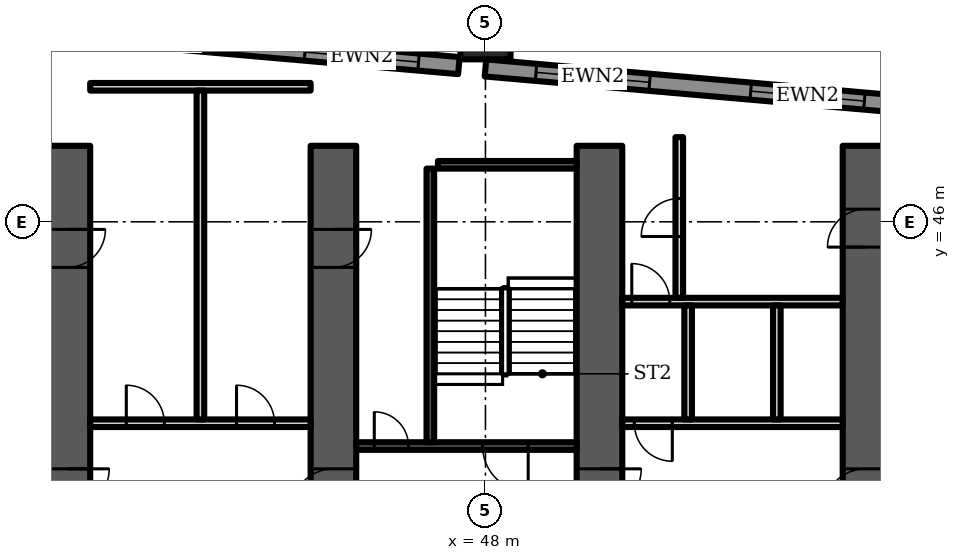
"""IFC4 building model, lengths in metres.
Left out: names, types, materials, properties, quantities, classifications, styles, units other than length and angle.
Written with IfcOpenShell. Run it as: python <this file> out.ifc"""

import sys

from ifc_helpers import new_model, si_unit, direction, frame, frame_2d, origin, origin_2d, place, context, subcontext, project, spatial, polyline, rectangle, outline, extrude, element, fill, save


model = new_model("IFC4")
c1 = context("Model", 3, precision=1e-05, world=origin(), true_north=direction((0.0, 1.0)))
c2 = subcontext(c1, "Body", "Model", "MODEL_VIEW")
j1 = project(units=[si_unit("LENGTHUNIT", "METRE"), si_unit("PLANEANGLEUNIT", "RADIAN")], contexts=[c1])
p1 = place(None, origin())
s1 = spatial("IfcSite", under=j1, at=p1, CompositionType="ELEMENT")
p2 = place(p1, origin())
s2 = spatial("IfcBuilding", under=s1, at=p2, CompositionType="ELEMENT")
p3 = place(p2, frame((0.0, 0.0, 15.0)))
s3 = spatial("IfcBuildingStorey", under=s2, at=p3, CompositionType="ELEMENT", Elevation=15.0)
p4 = place(p3, frame((48.0, 50.935, 0.0), z_axis=(0.0, 0.0, 1.0), x_axis=(1.0, 0.0, 0.0)))
e1 = element("IfcColumn", 1, at=p4, inside=s3, PredefinedType="COLUMN", context=c2, shape_type="SweptSolid", body=[
    extrude(rectangle(XDim=1.32, YDim=1.32, at=origin_2d()), origin(), (0.0, 0.0, 1.0), 6.5),
])
p5 = place(p3, frame((59.301, 49.06, 0.0), z_axis=(0.0, 0.0, 1.0), x_axis=(-0.996195, 0.087145, 0.0)))
e2 = element("IfcWall", 2, at=p5, inside=s3, PredefinedType="SOLIDWALL", context=c2, shape_type="SweptSolid", body=[
    extrude(rectangle(XDim=11.344, YDim=0.45, at=frame_2d((5.672, 0.0))), origin(), (0.0, 0.0, 1.0), 6.2),
])
p6 = place(p5, frame((1.336, 0.0, 1.0)))
e3 = element("IfcOpeningElement", 3, at=p6, cuts=e2, PredefinedType="OPENING", context=c2, shape_type="SweptSolid", body=[
    extrude(rectangle(XDim=3.0, YDim=4.2, at=frame_2d((1.5, 2.1))), frame((0.0, 0.235, 0.0), z_axis=(0.0, -1.0, 0.0), x_axis=(1.0, 0.0, 0.0)), (0.0, 0.0, 1.0), 0.47),
])
p7 = place(p5, frame((7.008, 0.0, 1.0)))
e4 = element("IfcOpeningElement", 4, at=p7, cuts=e2, PredefinedType="OPENING", context=c2, shape_type="SweptSolid", body=[
    extrude(rectangle(XDim=3.0, YDim=4.2, at=frame_2d((1.5, 2.1))), frame((0.0, 0.235, 0.0), z_axis=(0.0, -1.0, 0.0), x_axis=(1.0, 0.0, 0.0)), (0.0, 0.0, 1.0), 0.47),
])
p8 = place(p3, frame((47.301, 50.11, 0.0), z_axis=(0.0, 0.0, 1.0), x_axis=(-0.996195, 0.087143, 0.0)))
e5 = element("IfcWall", 5, at=p8, inside=s3, PredefinedType="SOLIDWALL", context=c2, shape_type="SweptSolid", body=[
    extrude(rectangle(XDim=10.26, YDim=0.45, at=frame_2d((5.13, 0.0))), origin(), (0.0, 0.0, 1.0), 6.2),
])
p9 = place(p8, frame((1.065, 0.0, 1.0)))
e6 = element("IfcOpeningElement", 6, at=p9, cuts=e5, PredefinedType="OPENING", context=c2, shape_type="SweptSolid", body=[
    extrude(rectangle(XDim=3.0, YDim=4.2, at=frame_2d((1.5, 2.1))), frame((0.0, 0.235, 0.0), z_axis=(0.0, -1.0, 0.0), x_axis=(1.0, 0.0, 0.0)), (0.0, 0.0, 1.0), 0.47),
])
p10 = place(p8, frame((6.195, 0.0, 1.0)))
e7 = element("IfcOpeningElement", 7, at=p10, cuts=e5, PredefinedType="OPENING", context=c2, shape_type="SweptSolid", body=[
    extrude(rectangle(XDim=3.0, YDim=4.2, at=frame_2d((1.5, 2.1))), frame((0.0, 0.235, 0.0), z_axis=(0.0, -1.0, 0.0), x_axis=(1.0, 0.0, 0.0)), (0.0, 0.0, 1.0), 0.47),
])
p11 = place(p3, frame((37.0, 35.2, 0.0), z_axis=(0.0, 0.0, 1.0), x_axis=(0.0, 1.0, 0.0)))
e8 = element("IfcWall", 8, at=p11, inside=s3, PredefinedType="SHEAR", context=c2, shape_type="SweptSolid", body=[
    extrude(rectangle(XDim=12.8, YDim=1.2, at=frame_2d((6.4, 0.0))), origin(), (0.0, 0.0, 1.0), 6.2),
])
p12 = place(p11, frame((3.2, 0.0, 0.0)))
e9 = element("IfcOpeningElement", 9, at=p12, cuts=e8, PredefinedType="OPENING", context=c2, shape_type="SweptSolid", body=[
    extrude(rectangle(XDim=1.1, YDim=2.1, at=frame_2d((0.55, 1.05))), frame((0.0, 0.61, 0.0), z_axis=(0.0, -1.0, 0.0), x_axis=(1.0, 0.0, 0.0)), (0.0, 0.0, 1.0), 1.22),
])
p13 = place(p11, frame((9.6, 0.0, 0.0)))
e10 = element("IfcOpeningElement", 10, at=p13, cuts=e8, PredefinedType="OPENING", context=c2, shape_type="SweptSolid", body=[
    extrude(rectangle(XDim=1.0, YDim=2.1, at=frame_2d((0.5, 1.05))), frame((0.0, 0.61, 0.0), z_axis=(0.0, -1.0, 0.0), x_axis=(1.0, 0.0, 0.0)), (0.0, 0.0, 1.0), 1.22),
])
p14 = place(p3, frame((44.0, 35.2, 0.0), z_axis=(0.0, 0.0, 1.0), x_axis=(0.0, 1.0, 0.0)))
e11 = element("IfcWall", 11, at=p14, inside=s3, PredefinedType="SHEAR", context=c2, shape_type="SweptSolid", body=[
    extrude(rectangle(XDim=12.8, YDim=1.2, at=frame_2d((6.4, 0.0))), origin(), (0.0, 0.0, 1.0), 6.2),
])
p15 = place(p14, frame((3.2, 0.0, 0.0)))
e12 = element("IfcOpeningElement", 12, at=p15, cuts=e11, PredefinedType="OPENING", context=c2, shape_type="SweptSolid", body=[
    extrude(rectangle(XDim=1.1, YDim=2.1, at=frame_2d((0.55, 1.05))), frame((0.0, 0.61, 0.0), z_axis=(0.0, -1.0, 0.0), x_axis=(1.0, 0.0, 0.0)), (0.0, 0.0, 1.0), 1.22),
])
p16 = place(p14, frame((9.6, 0.0, 0.0)))
e13 = element("IfcOpeningElement", 13, at=p16, cuts=e11, PredefinedType="OPENING", context=c2, shape_type="SweptSolid", body=[
    extrude(rectangle(XDim=1.0, YDim=2.1, at=frame_2d((0.5, 1.05))), frame((0.0, 0.61, 0.0), z_axis=(0.0, -1.0, 0.0), x_axis=(1.0, 0.0, 0.0)), (0.0, 0.0, 1.0), 1.22),
])
p17 = place(p3, frame((51.0, 35.2, 0.0), z_axis=(0.0, 0.0, 1.0), x_axis=(0.0, 1.0, 0.0)))
e14 = element("IfcWall", 14, at=p17, inside=s3, PredefinedType="SHEAR", context=c2, shape_type="SweptSolid", body=[
    extrude(rectangle(XDim=12.8, YDim=1.2, at=frame_2d((6.4, 0.0))), origin(), (0.0, 0.0, 1.0), 6.2),
])
p18 = place(p17, frame((3.2, 0.0, 0.0)))
e15 = element("IfcOpeningElement", 15, at=p18, cuts=e14, PredefinedType="OPENING", context=c2, shape_type="SweptSolid", body=[
    extrude(rectangle(XDim=1.1, YDim=2.1, at=frame_2d((0.55, 1.05))), frame((0.0, 0.61, 0.0), z_axis=(0.0, -1.0, 0.0), x_axis=(1.0, 0.0, 0.0)), (0.0, 0.0, 1.0), 1.22),
])
p19 = place(p3, frame((58.0, 35.2, 0.0), z_axis=(0.0, 0.0, 1.0), x_axis=(0.0, 1.0, 0.0)))
e16 = element("IfcWall", 16, at=p19, inside=s3, PredefinedType="SHEAR", context=c2, shape_type="SweptSolid", body=[
    extrude(rectangle(XDim=12.8, YDim=1.2, at=frame_2d((6.4, 0.0))), origin(), (0.0, 0.0, 1.0), 6.2),
])
p20 = place(p19, frame((10.134, 0.0, 0.0)))
e17 = element("IfcOpeningElement", 17, at=p20, cuts=e16, PredefinedType="OPENING", context=c2, shape_type="SweptSolid", body=[
    extrude(rectangle(XDim=1.0, YDim=2.1, at=frame_2d((0.5, 1.05))), frame((0.0, 0.61, 0.0), z_axis=(0.0, -1.0, 0.0), x_axis=(1.0, 0.0, 0.0)), (0.0, 0.0, 1.0), 1.22),
])
p21 = place(p19, frame((3.2, 0.0, 0.0)))
e18 = element("IfcOpeningElement", 18, at=p21, cuts=e16, PredefinedType="OPENING", context=c2, shape_type="SweptSolid", body=[
    extrude(rectangle(XDim=1.1, YDim=2.1, at=frame_2d((0.55, 1.05))), frame((0.0, 0.61, 0.0), z_axis=(0.0, -1.0, 0.0), x_axis=(1.0, 0.0, 0.0)), (0.0, 0.0, 1.0), 1.22),
])
p22 = place(p3, frame((37.6, 40.7, 0.0), z_axis=(0.0, 0.0, 1.0), x_axis=(1.0, 0.0, 0.0)))
e19 = element("IfcWall", 19, at=p22, inside=s3, PredefinedType="PARTITIONING", context=c2, shape_type="SweptSolid", body=[
    extrude(rectangle(XDim=5.8, YDim=0.2, at=frame_2d((2.9, 0.0))), origin(), (0.0, 0.0, 1.0), 6.2),
])
p23 = place(p22, frame((0.95, 0.0, 0.0)))
e20 = element("IfcOpeningElement", 20, at=p23, cuts=e19, PredefinedType="OPENING", context=c2, shape_type="SweptSolid", body=[
    extrude(rectangle(XDim=1.0, YDim=2.1, at=frame_2d((0.5, 1.05))), frame((0.0, 0.11, 0.0), z_axis=(0.0, -1.0, 0.0), x_axis=(1.0, 0.0, 0.0)), (0.0, 0.0, 1.0), 0.22),
])
p24 = place(p22, frame((3.85, 0.0, 0.0)))
e21 = element("IfcOpeningElement", 21, at=p24, cuts=e19, PredefinedType="OPENING", context=c2, shape_type="SweptSolid", body=[
    extrude(rectangle(XDim=1.0, YDim=2.1, at=frame_2d((0.5, 1.05))), frame((0.0, 0.11, 0.0), z_axis=(0.0, -1.0, 0.0), x_axis=(1.0, 0.0, 0.0)), (0.0, 0.0, 1.0), 0.22),
])
p25 = place(p3, frame((37.6, 49.552, 0.0), z_axis=(0.0, 0.0, 1.0), x_axis=(1.0, 0.0, 0.0)))
e22 = element("IfcWall", 22, at=p25, inside=s3, PredefinedType="PARTITIONING", context=c2, shape_type="SweptSolid", body=[
    extrude(rectangle(XDim=5.8, YDim=0.2, at=frame_2d((2.9, 0.0))), origin(), (0.0, 0.0, 1.0), 6.2),
])
p26 = place(p3, frame((40.5, 40.8, 0.0), z_axis=(0.0, 0.0, 1.0), x_axis=(0.0, 1.0, 0.0)))
e23 = element("IfcWall", 23, at=p26, inside=s3, PredefinedType="PARTITIONING", context=c2, shape_type="SweptSolid", body=[
    extrude(rectangle(XDim=8.653, YDim=0.2, at=frame_2d((4.326, 0.0))), origin(), (0.0, 0.0, 1.0), 6.2),
])
p27 = place(p3, frame((44.6, 40.1, 0.0), z_axis=(0.0, 0.0, 1.0), x_axis=(1.0, 0.0, 0.0)))
e24 = element("IfcWall", 24, at=p27, inside=s3, PredefinedType="SHEAR", context=c2, shape_type="SweptSolid", body=[
    extrude(rectangle(XDim=5.8, YDim=0.2, at=frame_2d((2.9, 0.0))), origin(), (0.0, 0.0, 1.0), 6.2),
])
p28 = place(p27, frame((3.325, 0.0, 0.0)))
e25 = element("IfcOpeningElement", 25, at=p28, cuts=e24, PredefinedType="OPENING", context=c2, shape_type="SweptSolid", body=[
    extrude(rectangle(XDim=1.2, YDim=2.1, at=frame_2d((0.6, 1.05))), frame((0.0, 0.11, 0.0), z_axis=(0.0, -1.0, 0.0), x_axis=(1.0, 0.0, 0.0)), (0.0, 0.0, 1.0), 0.22),
])
p29 = place(p27, frame((0.475, 0.0, 0.0)))
e26 = element("IfcOpeningElement", 26, at=p29, cuts=e24, PredefinedType="OPENING", context=c2, shape_type="SweptSolid", body=[
    extrude(rectangle(XDim=0.9, YDim=2.1, at=frame_2d((0.45, 1.05))), frame((0.0, 0.11, 0.0), z_axis=(0.0, -1.0, 0.0), x_axis=(1.0, 0.0, 0.0)), (0.0, 0.0, 1.0), 0.22),
])
p30 = place(p3, frame((46.55, 40.2, 0.0), z_axis=(0.0, 0.0, 1.0), x_axis=(0.0, 1.0, 0.0)))
e27 = element("IfcWall", 27, at=p30, inside=s3, PredefinedType="SHEAR", context=c2, shape_type="SweptSolid", body=[
    extrude(rectangle(XDim=7.2, YDim=0.2, at=frame_2d((3.6, 0.0))), origin(), (0.0, 0.0, 1.0), 6.2),
])
p31 = place(p3, frame((46.75, 47.5, 0.0), z_axis=(0.0, 0.0, 1.0), x_axis=(1.0, 0.0, 0.0)))
e28 = element("IfcWall", 28, at=p31, inside=s3, PredefinedType="SHEAR", context=c2, shape_type="SweptSolid", body=[
    extrude(rectangle(XDim=3.65, YDim=0.2, at=frame_2d((1.825, 0.0))), origin(), (0.0, 0.0, 1.0), 6.2),
])
p32 = place(p3, frame((51.6, 40.7, 0.0), z_axis=(0.0, 0.0, 1.0), x_axis=(1.0, 0.0, 0.0)))
e29 = element("IfcWall", 29, at=p32, inside=s3, PredefinedType="PARTITIONING", context=c2, shape_type="SweptSolid", body=[
    extrude(rectangle(XDim=5.8, YDim=0.2, at=frame_2d((2.9, 0.0))), origin(), (0.0, 0.0, 1.0), 6.2),
])
p33 = place(p32, frame((0.317, 0.0, 0.0)))
e30 = element("IfcOpeningElement", 30, at=p33, cuts=e29, PredefinedType="OPENING", context=c2, shape_type="SweptSolid", body=[
    extrude(rectangle(XDim=1.0, YDim=2.1, at=frame_2d((0.5, 1.05))), frame((0.0, 0.11, 0.0), z_axis=(0.0, -1.0, 0.0), x_axis=(1.0, 0.0, 0.0)), (0.0, 0.0, 1.0), 0.22),
])
p34 = place(p3, frame((51.6, 43.9, 0.0), z_axis=(0.0, 0.0, 1.0), x_axis=(1.0, 0.0, 0.0)))
e31 = element("IfcWall", 31, at=p34, inside=s3, PredefinedType="PARTITIONING", context=c2, shape_type="SweptSolid", body=[
    extrude(rectangle(XDim=5.8, YDim=0.2, at=frame_2d((2.9, 0.0))), origin(), (0.0, 0.0, 1.0), 6.2),
])
p35 = place(p34, frame((0.25, 0.0, 0.0)))
e32 = element("IfcOpeningElement", 32, at=p35, cuts=e31, PredefinedType="OPENING", context=c2, shape_type="SweptSolid", body=[
    extrude(rectangle(XDim=1.0, YDim=2.1, at=frame_2d((0.5, 1.05))), frame((0.0, 0.11, 0.0), z_axis=(0.0, -1.0, 0.0), x_axis=(1.0, 0.0, 0.0)), (0.0, 0.0, 1.0), 0.22),
])
p36 = place(p3, frame((0.0, 0.0, -0.0)))
e33 = element("IfcWall", 33, at=p36, inside=s3, PredefinedType="PARTITIONING", context=c2, shape_type="SweptSolid", body=[
    extrude(outline(polyline([(53.233, 40.8), (53.233, 43.8), (53.433, 43.8), (53.433, 40.8), (53.233, 40.8)])), origin(), (0.0, 0.0, 1.0), 6.2),
])
p37 = place(p3, frame((0.0, 0.0, -0.0)))
e34 = element("IfcWall", 34, at=p37, inside=s3, PredefinedType="PARTITIONING", context=c2, shape_type="SweptSolid", body=[
    extrude(outline(polyline([(55.567, 40.8), (55.567, 43.8), (55.767, 43.8), (55.767, 40.8), (55.567, 40.8)])), origin(), (0.0, 0.0, 1.0), 6.2),
])
p38 = place(p3, frame((53.1, 44.0, 0.0), z_axis=(0.0, 0.0, 1.0), x_axis=(0.0, 1.0, 0.0)))
e35 = element("IfcWall", 35, at=p38, inside=s3, PredefinedType="PARTITIONING", context=c2, shape_type="SweptSolid", body=[
    extrude(rectangle(XDim=4.228, YDim=0.2, at=frame_2d((2.114, 0.0))), origin(), (0.0, 0.0, 1.0), 6.2),
])
p39 = place(p38, frame((1.614, 0.0, 0.0)))
e36 = element("IfcOpeningElement", 36, at=p39, cuts=e35, PredefinedType="OPENING", context=c2, shape_type="SweptSolid", body=[
    extrude(rectangle(XDim=1.0, YDim=2.1, at=frame_2d((0.5, 1.05))), frame((0.0, 0.11, 0.0), z_axis=(0.0, -1.0, 0.0), x_axis=(1.0, 0.0, 0.0)), (0.0, 0.0, 1.0), 0.22),
])
p40 = place(p6, origin())
e37 = element("IfcWindow", 37, at=p40, inside=s3, PartitioningType="SINGLE_PANEL", PredefinedType="WINDOW", context=c2, shape_type="SweptSolid", body=[
    extrude(rectangle(XDim=3.0, YDim=4.2, at=frame_2d((1.5, 2.1))), frame((0.0, 0.105, 0.0), z_axis=(0.0, -1.0, 0.0), x_axis=(1.0, 0.0, 0.0)), (0.0, 0.0, 1.0), 0.06),
])
fill(e3, e37)
p41 = place(p7, origin())
e38 = element("IfcWindow", 38, at=p41, inside=s3, PartitioningType="SINGLE_PANEL", PredefinedType="WINDOW", context=c2, shape_type="SweptSolid", body=[
    extrude(rectangle(XDim=3.0, YDim=4.2, at=frame_2d((1.5, 2.1))), frame((0.0, 0.105, 0.0), z_axis=(0.0, -1.0, 0.0), x_axis=(1.0, 0.0, 0.0)), (0.0, 0.0, 1.0), 0.06),
])
fill(e4, e38)
p42 = place(p9, origin())
e39 = element("IfcWindow", 39, at=p42, inside=s3, PartitioningType="SINGLE_PANEL", PredefinedType="WINDOW", context=c2, shape_type="SweptSolid", body=[
    extrude(rectangle(XDim=3.0, YDim=4.2, at=frame_2d((1.5, 2.1))), frame((0.0, 0.105, 0.0), z_axis=(0.0, -1.0, 0.0), x_axis=(1.0, 0.0, 0.0)), (0.0, 0.0, 1.0), 0.06),
])
fill(e6, e39)
p43 = place(p23, origin())
e40 = element("IfcDoor", 40, at=p43, inside=s3, OperationType="SINGLE_SWING_LEFT", PredefinedType="DOOR", context=c2, shape_type="SweptSolid", body=[
    extrude(rectangle(XDim=1.0, YDim=2.1, at=frame_2d((0.5, 1.05))), frame((0.0, 0.025, 0.0), z_axis=(0.0, -1.0, 0.0), x_axis=(1.0, 0.0, 0.0)), (0.0, 0.0, 1.0), 0.05),
])
fill(e20, e40)
p44 = place(p24, origin())
e41 = element("IfcDoor", 41, at=p44, inside=s3, OperationType="SINGLE_SWING_LEFT", PredefinedType="DOOR", context=c2, shape_type="SweptSolid", body=[
    extrude(rectangle(XDim=1.0, YDim=2.1, at=frame_2d((0.5, 1.05))), frame((0.0, 0.025, 0.0), z_axis=(0.0, -1.0, 0.0), x_axis=(1.0, 0.0, 0.0)), (0.0, 0.0, 1.0), 0.05),
])
fill(e21, e41)
p45 = place(p28, origin())
e42 = element("IfcDoor", 42, at=p45, inside=s3, OperationType="SINGLE_SWING_RIGHT", PredefinedType="DOOR", context=c2, shape_type="SweptSolid", body=[
    extrude(rectangle(XDim=1.2, YDim=2.1, at=frame_2d((0.6, 1.05))), frame((0.0, 0.025, 0.0), z_axis=(0.0, -1.0, 0.0), x_axis=(1.0, 0.0, 0.0)), (0.0, 0.0, 1.0), 0.05),
])
fill(e25, e42)
p46 = place(p29, origin())
e43 = element("IfcDoor", 43, at=p46, inside=s3, OperationType="SINGLE_SWING_LEFT", PredefinedType="DOOR", context=c2, shape_type="SweptSolid", body=[
    extrude(rectangle(XDim=0.9, YDim=2.1, at=frame_2d((0.45, 1.05))), frame((0.0, 0.025, 0.0), z_axis=(0.0, -1.0, 0.0), x_axis=(1.0, 0.0, 0.0)), (0.0, 0.0, 1.0), 0.05),
])
fill(e26, e43)
p47 = place(p33, origin())
e44 = element("IfcDoor", 44, at=p47, inside=s3, OperationType="SINGLE_SWING_RIGHT", PredefinedType="DOOR", context=c2, shape_type="SweptSolid", body=[
    extrude(rectangle(XDim=1.0, YDim=2.1, at=frame_2d((0.5, 1.05))), frame((0.0, 0.025, 0.0), z_axis=(0.0, -1.0, 0.0), x_axis=(1.0, 0.0, 0.0)), (0.0, 0.0, 1.0), 0.05),
])
fill(e30, e44)
p48 = place(p35, origin())
e45 = element("IfcDoor", 45, at=p48, inside=s3, OperationType="SINGLE_SWING_LEFT", PredefinedType="DOOR", context=c2, shape_type="SweptSolid", body=[
    extrude(rectangle(XDim=1.0, YDim=2.1, at=frame_2d((0.5, 1.05))), frame((0.0, 0.025, 0.0), z_axis=(0.0, -1.0, 0.0), x_axis=(1.0, 0.0, 0.0)), (0.0, 0.0, 1.0), 0.05),
])
fill(e32, e45)
p49 = place(p39, origin())
e46 = element("IfcDoor", 46, at=p49, inside=s3, OperationType="SINGLE_SWING_LEFT", PredefinedType="DOOR", context=c2, shape_type="SweptSolid", body=[
    extrude(rectangle(XDim=1.0, YDim=2.1, at=frame_2d((0.5, 1.05))), frame((0.0, 0.025, 0.0), z_axis=(0.0, -1.0, 0.0), x_axis=(1.0, 0.0, 0.0)), (0.0, 0.0, 1.0), 0.05),
])
fill(e36, e46)
p50 = place(p20, origin())
e47 = element("IfcDoor", 47, at=p50, inside=s3, OperationType="SINGLE_SWING_LEFT", PredefinedType="DOOR", context=c2, shape_type="SweptSolid", body=[
    extrude(rectangle(XDim=1.0, YDim=2.1, at=frame_2d((0.5, 1.05))), frame((0.0, 0.6, 0.0), z_axis=(0.0, -1.0, 0.0), x_axis=(1.0, 0.0, 0.0)), (0.0, 0.0, 1.0), 1.199),
])
fill(e17, e47)
p51 = place(p12, origin())
e48 = element("IfcDoor", 48, at=p51, inside=s3, OperationType="SINGLE_SWING_RIGHT", PredefinedType="DOOR", context=c2, shape_type="SweptSolid", body=[
    extrude(rectangle(XDim=1.1, YDim=2.1, at=frame_2d((0.55, 1.05))), frame((0.0, 0.025, 0.0), z_axis=(0.0, -1.0, 0.0), x_axis=(1.0, 0.0, 0.0)), (0.0, 0.0, 1.0), 0.05),
])
fill(e9, e48)
p52 = place(p13, origin())
e49 = element("IfcDoor", 49, at=p52, inside=s3, OperationType="SINGLE_SWING_RIGHT", PredefinedType="DOOR", context=c2, shape_type="SweptSolid", body=[
    extrude(rectangle(XDim=1.0, YDim=2.1, at=frame_2d((0.5, 1.05))), frame((0.0, 0.6, 0.0), z_axis=(0.0, -1.0, 0.0), x_axis=(1.0, 0.0, 0.0)), (0.0, 0.0, 1.0), 1.199),
])
fill(e10, e49)
p53 = place(p15, origin())
e50 = element("IfcDoor", 50, at=p53, inside=s3, OperationType="SINGLE_SWING_LEFT", PredefinedType="DOOR", context=c2, shape_type="SweptSolid", body=[
    extrude(rectangle(XDim=1.1, YDim=2.1, at=frame_2d((0.55, 1.05))), frame((0.0, 0.025, 0.0), z_axis=(0.0, -1.0, 0.0), x_axis=(1.0, 0.0, 0.0)), (0.0, 0.0, 1.0), 0.05),
])
fill(e12, e50)
p54 = place(p16, origin())
e51 = element("IfcDoor", 51, at=p54, inside=s3, OperationType="SINGLE_SWING_RIGHT", PredefinedType="DOOR", context=c2, shape_type="SweptSolid", body=[
    extrude(rectangle(XDim=1.0, YDim=2.1, at=frame_2d((0.5, 1.05))), frame((0.0, 0.6, 0.0), z_axis=(0.0, -1.0, 0.0), x_axis=(1.0, 0.0, 0.0)), (0.0, 0.0, 1.0), 1.199),
])
fill(e13, e51)
p55 = place(p18, origin())
e52 = element("IfcDoor", 52, at=p55, inside=s3, OperationType="SINGLE_SWING_RIGHT", PredefinedType="DOOR", context=c2, shape_type="SweptSolid", body=[
    extrude(rectangle(XDim=1.1, YDim=2.1, at=frame_2d((0.55, 1.05))), frame((0.0, 0.025, 0.0), z_axis=(0.0, -1.0, 0.0), x_axis=(1.0, 0.0, 0.0)), (0.0, 0.0, 1.0), 0.05),
])
fill(e15, e52)
p56 = place(p21, origin())
e53 = element("IfcDoor", 53, at=p56, inside=s3, OperationType="SINGLE_SWING_LEFT", PredefinedType="DOOR", context=c2, shape_type="SweptSolid", body=[
    extrude(rectangle(XDim=1.1, YDim=2.1, at=frame_2d((0.55, 1.05))), frame((0.0, 0.025, 0.0), z_axis=(0.0, -1.0, 0.0), x_axis=(1.0, 0.0, 0.0)), (0.0, 0.0, 1.0), 0.05),
])
fill(e18, e53)
save(model, sys.argv[1])
